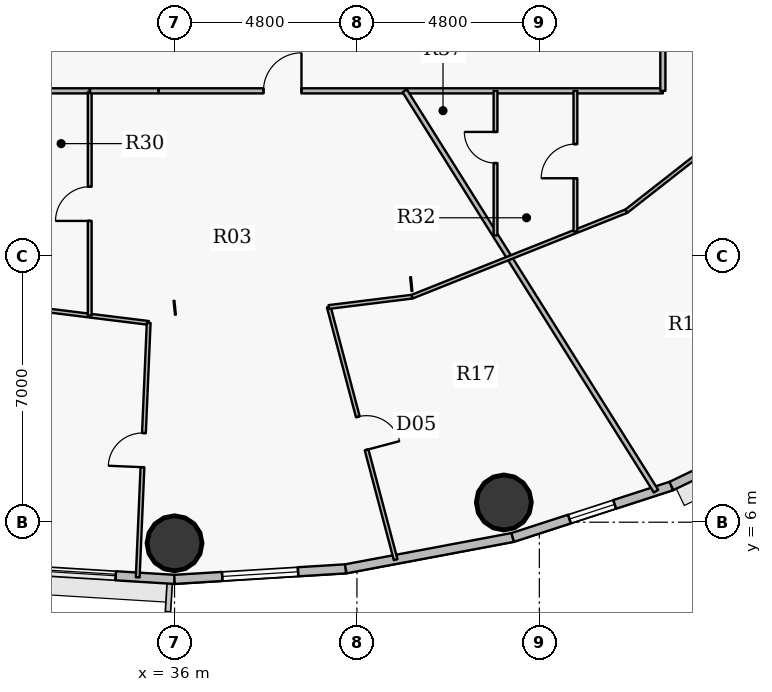
"""IFC4 building model, lengths in metres.
Left out: names, types, materials, properties, quantities, classifications, styles, units other than length and angle.
Written with IfcOpenShell. Run it as: python <this file> out.ifc"""

import sys

from ifc_helpers import new_model, si_unit, direction, frame, frame_2d, origin, origin_2d, place, context, subcontext, project, spatial, rectangle, hollow_circle, extrude, source, transform, mapped, element, fill, save


model = new_model("IFC4")
c1 = context("Model", 3, precision=1e-05, world=origin(), true_north=direction((0.0, 1.0)))
c2 = subcontext(c1, "Body", "Model", "MODEL_VIEW")
j1 = project(units=[si_unit("LENGTHUNIT", "METRE"), si_unit("PLANEANGLEUNIT", "RADIAN")], contexts=[c1])
p1 = place(None, origin())
s1 = spatial("IfcSite", under=j1, at=p1, CompositionType="ELEMENT")
p2 = place(p1, origin())
s2 = spatial("IfcBuilding", under=s1, at=p2, CompositionType="ELEMENT")
p3 = place(p2, frame((0.0, 0.0, 115.95)))
s3 = spatial("IfcBuildingStorey", under=s2, at=p3, CompositionType="ELEMENT", Elevation=115.95)
for number, where, z_axis, x_axis in (
    (1, (36.0, 5.445, 0.0), (0.0, 0.0, 1.0), (1.0, 0.0, 0.0)),
    (2, (44.666, 6.519, 0.0), (0.0, 0.0, 1.0), (1.0, 0.0, 0.0)),
):
    element("IfcColumn", number, at=place(p3, frame(where, z_axis=z_axis, x_axis=x_axis)), inside=s3, PredefinedType="COLUMN", context=c2, shape_type="SweptSolid", body=[
        extrude(hollow_circle(Radius=0.725, WallThickness=0.042, at=origin_2d()), origin(), (0.0, 0.0, 1.0), 3.75),
    ])
p4 = place(p3, frame((36.0, 4.495, 0.0), z_axis=(0.0, 0.0, 1.0), x_axis=(-0.998107531589, 0.061492726276, 0.0)))
e3 = element("IfcWall", 3, at=p4, inside=s3, PredefinedType="SOLIDWALL", context=c2, shape_type="SweptSolid", body=[
    extrude(rectangle(XDim=4.514, YDim=0.24, at=frame_2d((2.257, 0.0))), origin(), (0.0, 0.0, 1.0), 3.5),
])
p5 = place(p4, frame((1.55, 0.0, 0.9)))
e4 = element("IfcOpeningElement", 4, at=p5, cuts=e3, PredefinedType="OPENING", context=c2, shape_type="SweptSolid", body=[
    extrude(rectangle(XDim=2.0, YDim=1.75, at=origin_2d()), frame((1.0, 0.13, 0.875), z_axis=(0.0, -1.0, 0.0), x_axis=(1.0, 0.0, 0.0)), (0.0, 0.0, 1.0), 0.26),
])
p6 = place(p3, frame((40.506, 4.773, 0.0), z_axis=(0.0, 0.0, 1.0), x_axis=(-0.998107531589, -0.061492726276, 0.0)))
e5 = element("IfcWall", 5, at=p6, inside=s3, PredefinedType="SOLIDWALL", context=c2, shape_type="SweptSolid", body=[
    extrude(rectangle(XDim=4.514, YDim=0.24, at=frame_2d((2.257, 0.0))), origin(), (0.0, 0.0, 1.0), 3.5),
])
p7 = place(p6, frame((1.257, 0.0, 0.9)))
e6 = element("IfcOpeningElement", 6, at=p7, cuts=e5, PredefinedType="OPENING", context=c2, shape_type="SweptSolid", body=[
    extrude(rectangle(XDim=2.0, YDim=1.75, at=origin_2d()), frame((1.0, 0.13, 0.875), z_axis=(0.0, -1.0, 0.0), x_axis=(1.0, 0.0, 0.0)), (0.0, 0.0, 1.0), 0.26),
])
p8 = place(p3, frame((44.9, 5.599, 0.0), z_axis=(0.0, 0.0, 1.0), x_axis=(-0.982789252177, -0.184730305596, 0.0)))
e7 = element("IfcWall", 7, at=p8, inside=s3, PredefinedType="SOLIDWALL", context=c2, shape_type="SweptSolid", body=[
    extrude(rectangle(XDim=4.471, YDim=0.24, at=frame_2d((2.235, 0.0))), origin(), (0.0, 0.0, 1.0), 3.5),
])
p9 = place(p3, frame((49.074, 6.953, 0.0), z_axis=(0.0, 0.0, 1.0), x_axis=(-0.951211346073, -0.308540070495, 0.0)))
e8 = element("IfcWall", 8, at=p9, inside=s3, PredefinedType="SOLIDWALL", context=c2, shape_type="SweptSolid", body=[
    extrude(rectangle(XDim=4.388, YDim=0.24, at=frame_2d((2.194, 0.0))), origin(), (0.0, 0.0, 1.0), 3.5),
])
p10 = place(p9, frame((1.569, 0.0, 0.9)))
e9 = element("IfcOpeningElement", 9, at=p10, cuts=e8, PredefinedType="OPENING", context=c2, shape_type="SweptSolid", body=[
    extrude(rectangle(XDim=1.25, YDim=1.65, at=origin_2d()), frame((0.625, 0.13, 0.825), z_axis=(0.0, -1.0, 0.0), x_axis=(1.0, 0.0, 0.0)), (0.0, 0.0, 1.0), 0.26),
])
p11 = place(p3, frame((52.925, 8.801, 0.0), z_axis=(0.0, 0.0, 1.0), x_axis=(-0.901589935876, -0.432591709962, 0.0)))
e10 = element("IfcWall", 10, at=p11, inside=s3, PredefinedType="SOLIDWALL", context=c2, shape_type="SweptSolid", body=[
    extrude(rectangle(XDim=4.272, YDim=0.24, at=frame_2d((2.136, 0.0))), origin(), (0.0, 0.0, 1.0), 3.5),
])
p12 = place(p11, frame((1.136, 0.0, 0.9)))
e11 = element("IfcOpeningElement", 11, at=p12, cuts=e10, PredefinedType="OPENING", context=c2, shape_type="SweptSolid", body=[
    extrude(rectangle(XDim=2.0, YDim=1.75, at=origin_2d()), frame((1.0, 0.13, 0.875), z_axis=(0.0, -1.0, 0.0), x_axis=(1.0, 0.0, 0.0)), (0.0, 0.0, 1.0), 0.26),
])
p13 = place(p3, frame((23.15, 17.35, 0.0), z_axis=(0.0, 0.0, 1.0), x_axis=(1.0, 0.0, 0.0)))
e12 = element("IfcWall", 12, at=p13, inside=s3, PredefinedType="PARTITIONING", context=c2, shape_type="SweptSolid", body=[
    extrude(rectangle(XDim=10.619, YDim=0.135, at=frame_2d((5.31, 0.0))), origin(), (0.0, 0.0, 1.0), 2.935),
])
p14 = place(p13, frame((4.211, 0.0, 0.0)))
e13 = element("IfcOpeningElement", 13, at=p14, cuts=e12, PredefinedType="OPENING", context=c2, shape_type="SweptSolid", body=[
    extrude(rectangle(XDim=1.0, YDim=2.15, at=origin_2d()), frame((0.5, 0.078, 1.075), z_axis=(0.0, -1.0, 0.0), x_axis=(1.0, 0.0, 0.0)), (0.0, 0.0, 1.0), 0.155),
])
p15 = place(p3, frame((30.551, 11.835, 0.0), z_axis=(0.0, 0.0, 1.0), x_axis=(0.992401646286, -0.123040531728, 0.0)))
e14 = element("IfcWall", 14, at=p15, inside=s3, PredefinedType="PARTITIONING", context=c2, shape_type="SweptSolid", body=[
    extrude(rectangle(XDim=4.806, YDim=0.1, at=frame_2d((2.403, 0.0))), origin(), (0.0, 0.0, 1.0), 3.5),
])
p16 = place(p3, frame((33.769, 11.436, 0.0), z_axis=(0.0, 0.0, 1.0), x_axis=(0.0, 1.0, 0.0)))
e15 = element("IfcWall", 15, at=p16, inside=s3, PredefinedType="PARTITIONING", context=c2, shape_type="SweptSolid", body=[
    extrude(rectangle(XDim=5.884, YDim=0.1, at=frame_2d((2.942, 0.0))), origin(), (0.0, 0.0, 1.0), 3.5),
])
p17 = place(p16, frame((2.492, 0.0, 0.0)))
e16 = element("IfcOpeningElement", 16, at=p17, cuts=e15, PredefinedType="OPENING", context=c2, shape_type="SweptSolid", body=[
    extrude(rectangle(XDim=0.9, YDim=2.1, at=origin_2d()), frame((0.45, 0.06, 1.05), z_axis=(0.0, -1.0, 0.0), x_axis=(1.0, 0.0, 0.0)), (0.0, 0.0, 1.0), 0.12),
])
p18 = place(p3, frame((35.031, 4.55, 0.0), z_axis=(0.0, 0.0, 1.0), x_axis=(0.043108301027, 0.999070405118, 0.0)))
e17 = element("IfcWall", 17, at=p18, inside=s3, PredefinedType="PARTITIONING", context=c2, shape_type="SweptSolid", body=[
    extrude(rectangle(XDim=6.7, YDim=0.1, at=frame_2d((3.35, 0.0))), origin(), (0.0, 0.0, 1.0), 2.935),
])
p19 = place(p18, frame((2.9, 0.0, 0.0)))
e18 = element("IfcOpeningElement", 18, at=p19, cuts=e17, PredefinedType="OPENING", context=c2, shape_type="SweptSolid", body=[
    extrude(rectangle(XDim=0.9, YDim=2.1, at=origin_2d()), frame((0.45, 0.06, 1.05), z_axis=(0.0, -1.0, 0.0), x_axis=(1.0, 0.0, 0.0)), (0.0, 0.0, 1.0), 0.12),
])
p20 = place(p3, frame((35.584, 17.35, 0.0), z_axis=(0.0, 0.0, 1.0), x_axis=(1.0, 0.0, 0.0)))
e19 = element("IfcWall", 19, at=p20, inside=s3, PredefinedType="PARTITIONING", context=c2, shape_type="SweptSolid", body=[
    extrude(rectangle(XDim=13.266, YDim=0.135, at=frame_2d((6.633, 0.0))), origin(), (0.0, 0.0, 1.0), 2.935),
])
p21 = place(p20, frame((2.757, 0.0, 0.0)))
e20 = element("IfcOpeningElement", 20, at=p21, cuts=e19, PredefinedType="OPENING", context=c2, shape_type="SweptSolid", body=[
    extrude(rectangle(XDim=1.0, YDim=2.15, at=origin_2d()), frame((0.5, 0.078, 1.075), z_axis=(0.0, -1.0, 0.0), x_axis=(1.0, 0.0, 0.0)), (0.0, 0.0, 1.0), 0.155),
])
p22 = place(p3, frame((40.059, 11.662, 0.0), z_axis=(0.0, 0.0, 1.0), x_axis=(0.255861334688, -0.966713492929, 0.0)))
e21 = element("IfcWall", 21, at=p22, inside=s3, PredefinedType="PARTITIONING", context=c2, shape_type="SweptSolid", body=[
    extrude(rectangle(XDim=6.877, YDim=0.1, at=frame_2d((3.438, 0.0))), origin(), (0.0, 0.0, 1.0), 2.935),
])
p23 = place(p22, frame((2.988, 0.0, 0.0)))
e22 = element("IfcOpeningElement", 22, at=p23, cuts=e21, PredefinedType="OPENING", context=c2, shape_type="SweptSolid", body=[
    extrude(rectangle(XDim=0.9, YDim=2.1, at=origin_2d()), frame((0.45, 0.06, 1.05), z_axis=(0.0, -1.0, 0.0), x_axis=(1.0, 0.0, 0.0)), (0.0, 0.0, 1.0), 0.12),
])
p24 = place(p3, frame((40.059, 11.662, 0.0), z_axis=(0.0, 0.0, 1.0), x_axis=(0.992393057675, 0.12310978466, 0.0)))
e23 = element("IfcWall", 23, at=p24, inside=s3, PredefinedType="PARTITIONING", context=c2, shape_type="SweptSolid", body=[
    extrude(rectangle(XDim=2.209, YDim=0.1, at=frame_2d((1.104, 0.0))), origin(), (0.0, 0.0, 1.0), 2.935),
])
p25 = place(p3, frame((42.058, 17.35, 0.0), z_axis=(0.0, 0.0, 1.0), x_axis=(0.531660079213, -0.846957826678, 0.0)))
e24 = element("IfcWall", 24, at=p25, inside=s3, PredefinedType="PARTITIONING", context=c2, shape_type="SweptSolid", body=[
    extrude(rectangle(XDim=12.437, YDim=0.135, at=frame_2d((6.219, 0.0))), origin(), (0.0, 0.0, 1.0), 2.935),
])
p26 = place(p3, frame((42.251, 11.934, 0.0), z_axis=(0.0, 0.0, 1.0), x_axis=(0.928803554156, 0.370572473055, 0.0)))
e25 = element("IfcWall", 25, at=p26, inside=s3, PredefinedType="PARTITIONING", context=c2, shape_type="SweptSolid", body=[
    extrude(rectangle(XDim=6.072, YDim=0.1, at=frame_2d((3.036, 0.0))), origin(), (0.0, 0.0, 1.0), 2.935),
])
p27 = place(p3, frame((44.447, 13.544, 0.0), z_axis=(0.0, 0.0, 1.0), x_axis=(0.0, 1.0, 0.0)))
e26 = element("IfcWall", 26, at=p27, inside=s3, PredefinedType="PARTITIONING", context=c2, shape_type="SweptSolid", body=[
    extrude(rectangle(XDim=3.806, YDim=0.1, at=frame_2d((1.903, 0.0))), origin(), (0.0, 0.0, 1.0), 3.5),
])
p28 = place(p27, frame((1.905, 0.0, 0.0)))
e27 = element("IfcOpeningElement", 27, at=p28, cuts=e26, PredefinedType="OPENING", context=c2, shape_type="SweptSolid", body=[
    extrude(rectangle(XDim=0.82, YDim=2.1, at=origin_2d()), frame((0.41, 0.06, 1.05), z_axis=(0.0, -1.0, 0.0), x_axis=(1.0, 0.0, 0.0)), (0.0, 0.0, 1.0), 0.12),
])
p29 = place(p3, frame((46.549, 13.649, 0.0), z_axis=(0.0, 0.0, 1.0), x_axis=(0.0, 1.0, 0.0)))
e28 = element("IfcWall", 28, at=p29, inside=s3, PredefinedType="PARTITIONING", context=c2, shape_type="SweptSolid", body=[
    extrude(rectangle(XDim=3.701, YDim=0.1, at=frame_2d((1.851, 0.0))), origin(), (0.0, 0.0, 1.0), 3.5),
])
p30 = place(p29, frame((1.4, 0.0, 0.0)))
e29 = element("IfcOpeningElement", 29, at=p30, cuts=e28, PredefinedType="OPENING", context=c2, shape_type="SweptSolid", body=[
    extrude(rectangle(XDim=0.9, YDim=2.1, at=origin_2d()), frame((0.45, 0.06, 1.05), z_axis=(0.0, -1.0, 0.0), x_axis=(1.0, 0.0, 0.0)), (0.0, 0.0, 1.0), 0.12),
])
p31 = place(p3, frame((47.891, 14.184, 0.0), z_axis=(0.0, 0.0, 1.0), x_axis=(0.787364158956, 0.616488184146, 0.0)))
e30 = element("IfcWall", 30, at=p31, inside=s3, PredefinedType="PARTITIONING", context=c2, shape_type="SweptSolid", body=[
    extrude(rectangle(XDim=2.597, YDim=0.1, at=frame_2d((1.299, 0.0))), origin(), (0.0, 0.0, 1.0), 3.5),
])
p32 = place(p3, frame((48.85, 17.35, 0.0), z_axis=(0.0, 0.0, 1.0), x_axis=(0.0, 1.0, 0.0)))
e31 = element("IfcWall", 31, at=p32, inside=s3, PredefinedType="PARTITIONING", context=c2, shape_type="SweptSolid", body=[
    extrude(rectangle(XDim=19.3, YDim=0.135, at=frame_2d((9.65, 0.0))), origin(), (0.0, 0.0, 1.0), 2.935),
])
p33 = place(p32, frame((2.036, 0.0, 0.0)))
e32 = element("IfcOpeningElement", 32, at=p33, cuts=e31, PredefinedType="OPENING", context=c2, shape_type="SweptSolid", body=[
    extrude(rectangle(XDim=1.0, YDim=2.15, at=origin_2d()), frame((0.5, 0.078, 1.075), z_axis=(0.0, -1.0, 0.0), x_axis=(1.0, 0.0, 0.0)), (0.0, 0.0, 1.0), 0.155),
])
p34 = place(p32, frame((10.875, 0.0, 0.0)))
e33 = element("IfcOpeningElement", 33, at=p34, cuts=e31, PredefinedType="OPENING", context=c2, shape_type="SweptSolid", body=[
    extrude(rectangle(XDim=1.0, YDim=2.15, at=origin_2d()), frame((0.5, 0.078, 1.075), z_axis=(0.0, -1.0, 0.0), x_axis=(1.0, 0.0, 0.0)), (0.0, 0.0, 1.0), 0.155),
])
p35 = place(p3, frame((48.85, 22.383, 0.0), z_axis=(0.0, 0.0, 1.0), x_axis=(0.941089213164, -0.338158384292, 0.0)))
e34 = element("IfcWall", 34, at=p35, inside=s3, PredefinedType="PARTITIONING", context=c2, shape_type="SweptSolid", body=[
    extrude(rectangle(XDim=14.069, YDim=0.135, at=frame_2d((7.035, 0.0))), origin(), (0.0, 0.0, 1.0), 2.935),
])
p36 = place(p3, frame((35.574, 17.35, 0.0), z_axis=(0.0, 0.0, 1.0), x_axis=(-1.0, 0.0, 0.0)))
e35 = element("IfcWall", 35, at=p36, inside=s3, PredefinedType="PARTITIONING", context=c2, shape_type="SweptSolid", body=[
    extrude(rectangle(XDim=1.795, YDim=0.135, at=frame_2d((0.897, 0.0))), origin(), (0.0, 0.0, 1.0), 3.5),
])
m1 = source(origin(), c2, "Body", "SweptSolid", [
    extrude(rectangle(XDim=2.0, YDim=1.75, at=origin_2d()), frame((1.0, 0.03, 0.875), z_axis=(0.0, -1.0, 0.0), x_axis=(1.0, 0.0, 0.0)), (0.0, 0.0, 1.0), 0.06),
])
p37 = place(p5, origin())
e36 = element("IfcWindow", 36, at=p37, inside=s3, PartitioningType="DOUBLE_PANEL_VERTICAL", PredefinedType="WINDOW", context=c2, shape_type="MappedRepresentation", body=[
    mapped(m1, transform((0.0, 0.0, 0.0), x_axis=(1.0, 0.0, 0.0), y_axis=(0.0, 1.0, 0.0), z_axis=(0.0, 0.0, 1.0), scale=1.0)),
])
fill(e4, e36)
p38 = place(p7, origin())
e37 = element("IfcWindow", 37, at=p38, inside=s3, PartitioningType="DOUBLE_PANEL_VERTICAL", PredefinedType="WINDOW", context=c2, shape_type="MappedRepresentation", body=[
    mapped(m1, transform((0.0, 0.0, 0.0), x_axis=(1.0, 0.0, 0.0), y_axis=(0.0, 1.0, 0.0), z_axis=(0.0, 0.0, 1.0), scale=1.0)),
])
fill(e6, e37)
m2 = source(origin(), c2, "Body", "SweptSolid", [
    extrude(rectangle(XDim=1.25, YDim=1.65, at=origin_2d()), frame((0.625, 0.03, 0.825), z_axis=(0.0, -1.0, 0.0), x_axis=(1.0, 0.0, 0.0)), (0.0, 0.0, 1.0), 0.06),
])
p39 = place(p10, origin())
e38 = element("IfcWindow", 38, at=p39, inside=s3, PartitioningType="SINGLE_PANEL", PredefinedType="WINDOW", context=c2, shape_type="MappedRepresentation", body=[
    mapped(m2, transform((0.0, 0.0, 0.0), x_axis=(1.0, 0.0, 0.0), y_axis=(0.0, 1.0, 0.0), z_axis=(0.0, 0.0, 1.0), scale=1.0)),
])
fill(e9, e38)
m3 = source(origin(), c2, "Body", "SweptSolid", [
    extrude(rectangle(XDim=1.0, YDim=2.15, at=origin_2d()), frame((0.5, 0.025, 1.075), z_axis=(0.0, -1.0, 0.0), x_axis=(1.0, 0.0, 0.0)), (0.0, 0.0, 1.0), 0.05),
])
p40 = place(p21, origin())
e39 = element("IfcDoor", 39, at=p40, inside=s3, OperationType="SINGLE_SWING_RIGHT", PredefinedType="DOOR", context=c2, shape_type="MappedRepresentation", body=[
    mapped(m3, transform((0.0, 0.0, 0.0), x_axis=(1.0, 0.0, 0.0), y_axis=(0.0, 1.0, 0.0), z_axis=(0.0, 0.0, 1.0), scale=1.0)),
])
fill(e20, e39)
m4 = source(origin(), c2, "Body", "SweptSolid", [
    extrude(rectangle(XDim=0.9, YDim=2.1, at=origin_2d()), frame((0.45, 0.025, 1.05), z_axis=(0.0, -1.0, 0.0), x_axis=(1.0, 0.0, 0.0)), (0.0, 0.0, 1.0), 0.05),
])
p41 = place(p19, origin())
e40 = element("IfcDoor", 40, at=p41, inside=s3, OperationType="SINGLE_SWING_LEFT", PredefinedType="DOOR", context=c2, shape_type="MappedRepresentation", body=[
    mapped(m4, transform((0.0, 0.0, 0.0), x_axis=(1.0, 0.0, 0.0), y_axis=(0.0, 1.0, 0.0), z_axis=(0.0, 0.0, 1.0), scale=1.0)),
])
fill(e18, e40)
p42 = place(p23, origin())
e41 = element("IfcDoor", 41, at=p42, inside=s3, OperationType="SINGLE_SWING_RIGHT", PredefinedType="DOOR", context=c2, shape_type="MappedRepresentation", body=[
    mapped(m4, transform((0.0, 0.0, 0.0), x_axis=(1.0, 0.0, 0.0), y_axis=(0.0, 1.0, 0.0), z_axis=(0.0, 0.0, 1.0), scale=1.0)),
])
fill(e22, e41)
p43 = place(p17, origin())
e42 = element("IfcDoor", 42, at=p43, inside=s3, OperationType="SINGLE_SWING_LEFT", PredefinedType="DOOR", context=c2, shape_type="MappedRepresentation", body=[
    mapped(m4, transform((0.0, 0.0, 0.0), x_axis=(1.0, 0.0, 0.0), y_axis=(0.0, 1.0, 0.0), z_axis=(0.0, 0.0, 1.0), scale=1.0)),
])
fill(e16, e42)
p44 = place(p30, origin())
e43 = element("IfcDoor", 43, at=p44, inside=s3, OperationType="SINGLE_SWING_LEFT", PredefinedType="DOOR", context=c2, shape_type="MappedRepresentation", body=[
    mapped(m4, transform((0.0, 0.0, 0.0), x_axis=(1.0, 0.0, 0.0), y_axis=(0.0, 1.0, 0.0), z_axis=(0.0, 0.0, 1.0), scale=1.0)),
])
fill(e29, e43)
m5 = source(origin(), c2, "Body", "SweptSolid", [
    extrude(rectangle(XDim=0.82, YDim=2.1, at=origin_2d()), frame((0.41, 0.025, 1.05), z_axis=(0.0, -1.0, 0.0), x_axis=(1.0, 0.0, 0.0)), (0.0, 0.0, 1.0), 0.05),
])
p45 = place(p28, origin())
e44 = element("IfcDoor", 44, at=p45, inside=s3, OperationType="SINGLE_SWING_RIGHT", PredefinedType="DOOR", context=c2, shape_type="MappedRepresentation", body=[
    mapped(m5, transform((0.0, 0.0, 0.0), x_axis=(1.0, 0.0, 0.0), y_axis=(0.0, 1.0, 0.0), z_axis=(0.0, 0.0, 1.0), scale=1.0)),
])
fill(e27, e44)
save(model, sys.argv[1])
